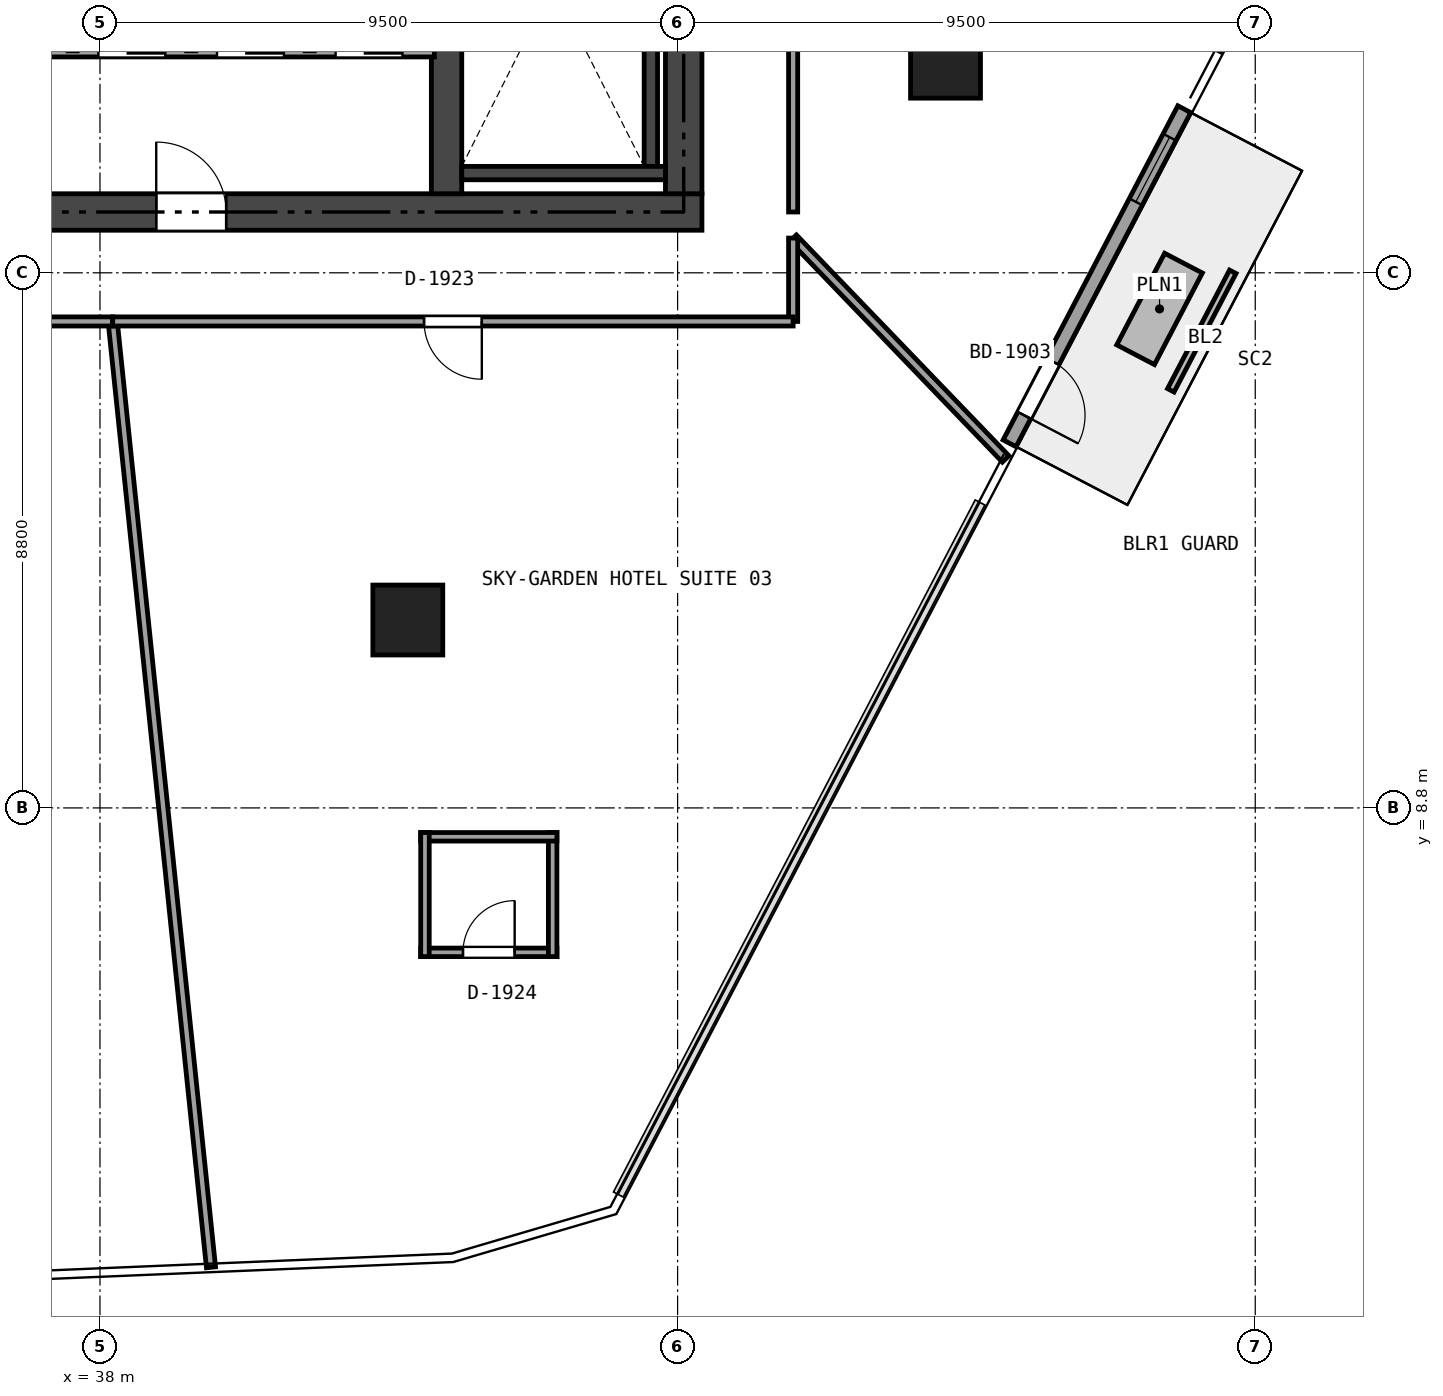
"""IFC4 building model, lengths in metres.
Left out: names, types, materials, properties, quantities, classifications, styles, units other than length and angle.
Written with IfcOpenShell. Run it as: python <this file> out.ifc"""

import sys

from ifc_helpers import new_model, si_unit, direction, frame, frame_2d, origin, origin_2d, place, context, subcontext, project, spatial, rectangle, extrude, element, fill, save


model = new_model("IFC4")
c1 = context("Model", 3, precision=1e-05, world=origin(), true_north=direction((0.0, 1.0)))
c2 = subcontext(c1, "Body", "Model", "MODEL_VIEW")
j1 = project(units=[si_unit("LENGTHUNIT", "METRE"), si_unit("PLANEANGLEUNIT", "RADIAN")], contexts=[c1])
p1 = place(None, origin())
s1 = spatial("IfcSite", under=j1, at=p1, CompositionType="ELEMENT")
p2 = place(p1, origin())
s2 = spatial("IfcBuilding", under=s1, at=p2, CompositionType="ELEMENT")
p3 = place(p2, frame((0.0, 0.0, 76.35)))
s3 = spatial("IfcBuildingStorey", under=s2, at=p3, CompositionType="ELEMENT", Elevation=76.35)
p4 = place(p3, frame((26.5, 18.6, 0.0), z_axis=(0.0, 0.0, 1.0), x_axis=(1.0, 0.0, 0.0)))
e1 = element("IfcWall", 1, at=p4, inside=s3, PredefinedType="SHEAR", context=c2, shape_type="SweptSolid", body=[
    extrude(rectangle(XDim=21.4, YDim=0.6, at=frame_2d((10.7, 0.0))), origin(), (0.0, 0.0, 1.0), 3.17),
])
p5 = place(p4, frame((12.425, 0.0, 0.0)))
e2 = element("IfcOpeningElement", 2, at=p5, cuts=e1, PredefinedType="OPENING", context=c2, shape_type="SweptSolid", body=[
    extrude(rectangle(XDim=1.15, YDim=2.15, at=frame_2d((0.575, 1.075))), frame((0.0, 0.31, 0.0), z_axis=(0.0, -1.0, 0.0), x_axis=(1.0, 0.0, 0.0)), (0.0, 0.0, 1.0), 0.62),
])
p6 = place(p4, frame((5.25, 0.0, 0.0)))
e3 = element("IfcOpeningElement", 3, at=p6, cuts=e1, PredefinedType="OPENING", context=c2, shape_type="SweptSolid", body=[
    extrude(rectangle(XDim=0.9, YDim=2.1, at=frame_2d((0.45, 1.05))), frame((0.0, 0.31, 0.0), z_axis=(0.0, -1.0, 0.0), x_axis=(1.0, 0.0, 0.0)), (0.0, 0.0, 1.0), 0.62),
])
p7 = place(p3, frame((47.6, 18.9, 0.0), z_axis=(0.0, 0.0, 1.0), x_axis=(0.0, 1.0, 0.0)))
e4 = element("IfcWall", 4, at=p7, inside=s3, PredefinedType="SHEAR", context=c2, shape_type="SweptSolid", body=[
    extrude(rectangle(XDim=15.0, YDim=0.6, at=frame_2d((7.5, 0.0))), origin(), (0.0, 0.0, 1.0), 3.17),
])
p8 = place(p7, frame((6.6, 0.0, 0.0)))
e5 = element("IfcOpeningElement", 5, at=p8, cuts=e4, PredefinedType="OPENING", context=c2, shape_type="SweptSolid", body=[
    extrude(rectangle(XDim=1.1, YDim=2.15, at=frame_2d((0.55, 1.075))), frame((0.0, 0.31, 0.0), z_axis=(0.0, -1.0, 0.0), x_axis=(1.0, 0.0, 0.0)), (0.0, 0.0, 1.0), 0.62),
])
p9 = place(p7, frame((8.5, 0.0, 0.0)))
e6 = element("IfcOpeningElement", 6, at=p9, cuts=e4, PredefinedType="OPENING", context=c2, shape_type="SweptSolid", body=[
    extrude(rectangle(XDim=0.9, YDim=2.1, at=frame_2d((0.45, 1.05))), frame((0.0, 0.31, 0.0), z_axis=(0.0, -1.0, 0.0), x_axis=(1.0, 0.0, 0.0)), (0.0, 0.0, 1.0), 0.62),
])
p10 = place(p7, frame((13.15, 0.0, 0.0)))
e7 = element("IfcOpeningElement", 7, at=p10, cuts=e4, PredefinedType="OPENING", context=c2, shape_type="SweptSolid", body=[
    extrude(rectangle(XDim=0.9, YDim=2.1, at=frame_2d((0.45, 1.05))), frame((0.0, 0.31, 0.0), z_axis=(0.0, -1.0, 0.0), x_axis=(1.0, 0.0, 0.0)), (0.0, 0.0, 1.0), 0.62),
])
p11 = place(p3, frame((43.7, 18.9, 0.0), z_axis=(0.0, 0.0, 1.0), x_axis=(0.0, 1.0, 0.0)))
e8 = element("IfcWall", 8, at=p11, inside=s3, PredefinedType="SHEAR", context=c2, shape_type="SweptSolid", body=[
    extrude(rectangle(XDim=15.0, YDim=0.5, at=frame_2d((7.5, 0.0))), origin(), (0.0, 0.0, 1.0), 3.17),
])
p12 = place(p11, frame((8.1, 0.0, 0.0)))
e9 = element("IfcOpeningElement", 9, at=p12, cuts=e8, PredefinedType="OPENING", context=c2, shape_type="SweptSolid", body=[
    extrude(rectangle(XDim=0.9, YDim=2.1, at=frame_2d((0.45, 1.05))), frame((0.0, 0.26, 0.0), z_axis=(0.0, -1.0, 0.0), x_axis=(1.0, 0.0, 0.0)), (0.0, 0.0, 1.0), 0.52),
])
p13 = place(p3, frame((47.06, 19.35, 0.0), z_axis=(0.0, 0.0, 1.0), x_axis=(0.0, 1.0, 0.0)))
e10 = element("IfcWall", 10, at=p13, inside=s3, PredefinedType="SHEAR", context=c2, shape_type="SweptSolid", body=[
    extrude(rectangle(XDim=5.9, YDim=0.22, at=frame_2d((2.95, 0.0))), origin(), (0.0, 0.0, 1.0), 3.17),
])
p14 = place(p3, frame((43.95, 19.24, 0.0), z_axis=(0.0, 0.0, 1.0), x_axis=(1.0, 0.0, 0.0)))
e11 = element("IfcWall", 11, at=p14, inside=s3, PredefinedType="SHEAR", context=c2, shape_type="SweptSolid", body=[
    extrude(rectangle(XDim=3.35, YDim=0.22, at=frame_2d((1.675, 0.0))), origin(), (0.0, 0.0, 1.0), 3.17),
])
for number, where, z_axis, x_axis in (
    (12, (43.063, 11.89, -0.405), (0.0, 0.0, 1.0), (1.0, 0.0, 0.0)),
    (13, (51.906, 21.047, -0.405), (0.0, 0.0, 1.0), (1.0, 0.0, 0.0)),
):
    element("IfcColumn", number, at=place(p3, frame(where, z_axis=z_axis, x_axis=x_axis)), inside=s3, PredefinedType="COLUMN", context=c2, shape_type="SweptSolid", body=[
        extrude(rectangle(XDim=1.15, YDim=1.15, at=origin_2d()), origin(), (0.0, 0.0, 1.0), 3.575),
    ])
p15 = place(p3, frame((55.833, 20.291, 0.0), z_axis=(0.0, 0.0, 1.0), x_axis=(-0.463330108623, -0.8861857652, 0.0)))
e14 = element("IfcWall", 14, at=p15, inside=s3, PredefinedType="SOLIDWALL", context=c2, shape_type="SweptSolid", body=[
    extrude(rectangle(XDim=6.201, YDim=0.24, at=frame_2d((3.101, 0.0))), origin(), (0.0, 0.0, 1.0), 3.17),
])
p16 = place(p15, frame((4.681, 0.0, 0.0)))
e15 = element("IfcOpeningElement", 15, at=p16, cuts=e14, PredefinedType="OPENING", context=c2, shape_type="SweptSolid", body=[
    extrude(rectangle(XDim=1.0, YDim=2.15, at=frame_2d((0.5, 1.075))), frame((0.0, 0.13, 0.0), z_axis=(0.0, -1.0, 0.0), x_axis=(1.0, 0.0, 0.0)), (0.0, 0.0, 1.0), 0.26),
])
p17 = place(p15, frame((0.52, 0.0, 0.2)))
e16 = element("IfcOpeningElement", 16, at=p17, cuts=e14, PredefinedType="OPENING", context=c2, shape_type="SweptSolid", body=[
    extrude(rectangle(XDim=1.2, YDim=1.8, at=frame_2d((0.6, 0.9))), frame((0.0, 0.13, 0.0), z_axis=(0.0, -1.0, 0.0), x_axis=(1.0, 0.0, 0.0)), (0.0, 0.0, 1.0), 0.26),
])
p18 = place(p3, frame((35.62, 21.25, 0.0), z_axis=(0.0, 0.0, 1.0), x_axis=(1.0, 0.0, 0.0)))
e17 = element("IfcWall", 17, at=p18, inside=s3, PredefinedType="SOLIDWALL", context=c2, shape_type="SweptSolid", body=[
    extrude(rectangle(XDim=7.88, YDim=0.2, at=frame_2d((3.94, 0.0))), origin(), (0.0, 0.0, 1.0), 3.17),
])
p19 = place(p18, frame((0.405, 0.0, 0.0)))
e18 = element("IfcOpeningElement", 18, at=p19, cuts=e17, PredefinedType="OPENING", context=c2, shape_type="SweptSolid", body=[
    extrude(rectangle(XDim=1.1, YDim=2.15, at=frame_2d((0.55, 1.075))), frame((0.0, 0.11, 0.0), z_axis=(0.0, -1.0, 0.0), x_axis=(1.0, 0.0, 0.0)), (0.0, 0.0, 1.0), 0.22),
])
p20 = place(p18, frame((2.355, 0.0, 0.0)))
e19 = element("IfcOpeningElement", 19, at=p20, cuts=e17, PredefinedType="OPENING", context=c2, shape_type="SweptSolid", body=[
    extrude(rectangle(XDim=1.1, YDim=2.15, at=frame_2d((0.55, 1.075))), frame((0.0, 0.11, 0.0), z_axis=(0.0, -1.0, 0.0), x_axis=(1.0, 0.0, 0.0)), (0.0, 0.0, 1.0), 0.22),
])
p21 = place(p18, frame((4.305, 0.0, 0.0)))
e20 = element("IfcOpeningElement", 20, at=p21, cuts=e17, PredefinedType="OPENING", context=c2, shape_type="SweptSolid", body=[
    extrude(rectangle(XDim=1.1, YDim=2.15, at=frame_2d((0.55, 1.075))), frame((0.0, 0.11, 0.0), z_axis=(0.0, -1.0, 0.0), x_axis=(1.0, 0.0, 0.0)), (0.0, 0.0, 1.0), 0.22),
])
p22 = place(p18, frame((6.255, 0.0, 0.0)))
e21 = element("IfcOpeningElement", 21, at=p22, cuts=e17, PredefinedType="OPENING", context=c2, shape_type="SweptSolid", body=[
    extrude(rectangle(XDim=1.1, YDim=2.15, at=frame_2d((0.55, 1.075))), frame((0.0, 0.11, 0.0), z_axis=(0.0, -1.0, 0.0), x_axis=(1.0, 0.0, 0.0)), (0.0, 0.0, 1.0), 0.22),
])
p23 = place(p3, frame((43.275, 6.425, 0.0), z_axis=(0.0, 0.0, 1.0), x_axis=(1.0, 0.0, 0.0)))
e22 = element("IfcWall", 22, at=p23, inside=s3, PredefinedType="PARTITIONING", context=c2, shape_type="SweptSolid", body=[
    extrude(rectangle(XDim=2.24, YDim=0.14, at=frame_2d((1.12, 0.0))), origin(), (0.0, 0.0, 1.0), 3.17),
])
p24 = place(p23, frame((0.695, 0.0, 0.0)))
e23 = element("IfcOpeningElement", 23, at=p24, cuts=e22, PredefinedType="OPENING", context=c2, shape_type="SweptSolid", body=[
    extrude(rectangle(XDim=0.85, YDim=2.1, at=frame_2d((0.425, 1.05))), frame((0.0, 0.08, 0.0), z_axis=(0.0, -1.0, 0.0), x_axis=(1.0, 0.0, 0.0)), (0.0, 0.0, 1.0), 0.16),
])
p25 = place(p3, frame((45.445, 6.355, 0.0), z_axis=(0.0, 0.0, 1.0), x_axis=(0.0, 1.0, 0.0)))
e24 = element("IfcWall", 24, at=p25, inside=s3, PredefinedType="PARTITIONING", context=c2, shape_type="SweptSolid", body=[
    extrude(rectangle(XDim=2.04, YDim=0.14, at=frame_2d((1.02, 0.0))), origin(), (0.0, 0.0, 1.0), 3.17),
])
p26 = place(p3, frame((45.515, 8.325, 0.0), z_axis=(0.0, 0.0, 1.0), x_axis=(-1.0, 0.0, 0.0)))
e25 = element("IfcWall", 25, at=p26, inside=s3, PredefinedType="PARTITIONING", context=c2, shape_type="SweptSolid", body=[
    extrude(rectangle(XDim=2.24, YDim=0.14, at=frame_2d((1.12, 0.0))), origin(), (0.0, 0.0, 1.0), 3.17),
])
p27 = place(p3, frame((43.345, 8.395, 0.0), z_axis=(0.0, 0.0, 1.0), x_axis=(0.0, -1.0, 0.0)))
e26 = element("IfcWall", 26, at=p27, inside=s3, PredefinedType="PARTITIONING", context=c2, shape_type="SweptSolid", body=[
    extrude(rectangle(XDim=2.04, YDim=0.14, at=frame_2d((1.02, 0.0))), origin(), (0.0, 0.0, 1.0), 3.17),
])
p28 = place(p3, frame((39.826, 1.245, 0.0), z_axis=(0.0, 0.0, 1.0), x_axis=(-0.103393409404, 0.994640539538, 0.0)))
e27 = element("IfcWall", 27, at=p28, inside=s3, PredefinedType="PARTITIONING", context=c2, shape_type="SweptSolid", body=[
    extrude(rectangle(XDim=15.639, YDim=0.15, at=frame_2d((7.819, 0.0))), origin(), (0.0, 0.0, 1.0), 2.455),
])
p29 = place(p3, frame((38.209, 16.8, 0.0), z_axis=(0.0, 0.0, 1.0), x_axis=(-1.0, 0.0, 0.0)))
e28 = element("IfcWall", 28, at=p29, inside=s3, PredefinedType="PARTITIONING", context=c2, shape_type="SweptSolid", body=[
    extrude(rectangle(XDim=11.671, YDim=0.15, at=frame_2d((5.835, 0.0))), origin(), (0.0, 0.0, 1.0), 2.455),
])
p30 = place(p29, frame((5.361, 0.0, 0.0)))
e29 = element("IfcOpeningElement", 29, at=p30, cuts=e28, PredefinedType="OPENING", context=c2, shape_type="SweptSolid", body=[
    extrude(rectangle(XDim=0.95, YDim=2.15, at=frame_2d((0.475, 1.075))), frame((0.0, 0.085, 0.0), z_axis=(0.0, -1.0, 0.0), x_axis=(1.0, 0.0, 0.0)), (0.0, 0.0, 1.0), 0.17),
])
p31 = place(p3, frame((52.895, 14.539, 0.0), z_axis=(0.0, 0.0, 1.0), x_axis=(-0.693414536175, 0.720538882379, 0.0)))
e30 = element("IfcWall", 30, at=p31, inside=s3, PredefinedType="PARTITIONING", context=c2, shape_type="SweptSolid", body=[
    extrude(rectangle(XDim=5.041, YDim=0.15, at=frame_2d((2.52, 0.0))), origin(), (0.0, 0.0, 1.0), 3.17),
])
p32 = place(p3, frame((49.4, 18.171, 0.0), z_axis=(0.0, 0.0, 1.0), x_axis=(0.0, -1.0, 0.0)))
e31 = element("IfcWall", 31, at=p32, inside=s3, PredefinedType="PARTITIONING", context=c2, shape_type="SweptSolid", body=[
    extrude(rectangle(XDim=1.371, YDim=0.15, at=frame_2d((0.686, 0.0))), origin(), (0.0, 0.0, 1.0), 3.17),
])
p33 = place(p3, frame((49.4, 16.8, 0.0), z_axis=(0.0, 0.0, 1.0), x_axis=(-1.0, 0.0, 0.0)))
e32 = element("IfcWall", 32, at=p33, inside=s3, PredefinedType="PARTITIONING", context=c2, shape_type="SweptSolid", body=[
    extrude(rectangle(XDim=11.191, YDim=0.15, at=frame_2d((5.595, 0.0))), origin(), (0.0, 0.0, 1.0), 2.455),
])
p34 = place(p33, frame((5.12, 0.0, 0.0)))
e33 = element("IfcOpeningElement", 33, at=p34, cuts=e32, PredefinedType="OPENING", context=c2, shape_type="SweptSolid", body=[
    extrude(rectangle(XDim=0.95, YDim=2.15, at=frame_2d((0.475, 1.075))), frame((0.0, 0.085, 0.0), z_axis=(0.0, -1.0, 0.0), x_axis=(1.0, 0.0, 0.0)), (0.0, 0.0, 1.0), 0.17),
])
p35 = place(p3, frame((49.4, 29.669, 0.0), z_axis=(0.0, 0.0, 1.0), x_axis=(0.0, -1.0, 0.0)))
e34 = element("IfcWall", 34, at=p35, inside=s3, PredefinedType="PARTITIONING", context=c2, shape_type="SweptSolid", body=[
    extrude(rectangle(XDim=11.069, YDim=0.15, at=frame_2d((5.534, 0.0))), origin(), (0.0, 0.0, 1.0), 2.455),
])
p36 = place(p35, frame((5.06, 0.0, 0.0)))
e35 = element("IfcOpeningElement", 35, at=p36, cuts=e34, PredefinedType="OPENING", context=c2, shape_type="SweptSolid", body=[
    extrude(rectangle(XDim=0.95, YDim=2.15, at=frame_2d((0.475, 1.075))), frame((0.0, 0.085, 0.0), z_axis=(0.0, -1.0, 0.0), x_axis=(1.0, 0.0, 0.0)), (0.0, 0.0, 1.0), 0.17),
])
p37 = place(p16, origin())
e36 = element("IfcDoor", 36, at=p37, inside=s3, OperationType="SINGLE_SWING_RIGHT", PredefinedType="DOOR", context=c2, shape_type="SweptSolid", body=[
    extrude(rectangle(XDim=1.0, YDim=2.15, at=frame_2d((0.5, 1.075))), frame((0.0, 0.025, 0.0), z_axis=(0.0, -1.0, 0.0), x_axis=(1.0, 0.0, 0.0)), (0.0, 0.0, 1.0), 0.05),
])
fill(e15, e36)
p38 = place(p17, origin())
e37 = element("IfcWindow", 37, at=p38, inside=s3, PartitioningType="SINGLE_PANEL", PredefinedType="WINDOW", context=c2, shape_type="SweptSolid", body=[
    extrude(rectangle(XDim=1.2, YDim=1.8, at=frame_2d((0.6, 0.9))), frame((0.0, 0.03, 0.0), z_axis=(0.0, -1.0, 0.0), x_axis=(1.0, 0.0, 0.0)), (0.0, 0.0, 1.0), 0.06),
])
fill(e16, e37)
p39 = place(p5, origin())
e38 = element("IfcDoor", 38, at=p39, inside=s3, OperationType="SINGLE_SWING_LEFT", PredefinedType="DOOR", context=c2, shape_type="SweptSolid", body=[
    extrude(rectangle(XDim=1.15, YDim=2.15, at=frame_2d((0.575, 1.075))), frame((0.0, 0.025, 0.0), z_axis=(0.0, -1.0, 0.0), x_axis=(1.0, 0.0, 0.0)), (0.0, 0.0, 1.0), 0.05),
])
fill(e2, e38)
p40 = place(p20, origin())
e39 = element("IfcDoor", 39, at=p40, inside=s3, OperationType="SLIDING_TO_LEFT", PredefinedType="DOOR", context=c2, shape_type="SweptSolid", body=[
    extrude(rectangle(XDim=1.1, YDim=2.15, at=frame_2d((0.55, 1.075))), frame((0.0, 0.025, 0.0), z_axis=(0.0, -1.0, 0.0), x_axis=(1.0, 0.0, 0.0)), (0.0, 0.0, 1.0), 0.05),
])
fill(e19, e39)
p41 = place(p21, origin())
e40 = element("IfcDoor", 40, at=p41, inside=s3, OperationType="SLIDING_TO_LEFT", PredefinedType="DOOR", context=c2, shape_type="SweptSolid", body=[
    extrude(rectangle(XDim=1.1, YDim=2.15, at=frame_2d((0.55, 1.075))), frame((0.0, 0.025, 0.0), z_axis=(0.0, -1.0, 0.0), x_axis=(1.0, 0.0, 0.0)), (0.0, 0.0, 1.0), 0.05),
])
fill(e20, e40)
p42 = place(p22, origin())
e41 = element("IfcDoor", 41, at=p42, inside=s3, OperationType="SLIDING_TO_LEFT", PredefinedType="DOOR", context=c2, shape_type="SweptSolid", body=[
    extrude(rectangle(XDim=1.1, YDim=2.15, at=frame_2d((0.55, 1.075))), frame((0.0, 0.025, 0.0), z_axis=(0.0, -1.0, 0.0), x_axis=(1.0, 0.0, 0.0)), (0.0, 0.0, 1.0), 0.05),
])
fill(e21, e41)
p43 = place(p34, origin())
e42 = element("IfcDoor", 42, at=p43, inside=s3, OperationType="SINGLE_SWING_LEFT", PredefinedType="DOOR", context=c2, shape_type="SweptSolid", body=[
    extrude(rectangle(XDim=0.95, YDim=2.15, at=frame_2d((0.475, 1.075))), frame((0.0, 0.025, 0.0), z_axis=(0.0, -1.0, 0.0), x_axis=(1.0, 0.0, 0.0)), (0.0, 0.0, 1.0), 0.05),
])
fill(e33, e42)
p44 = place(p24, origin())
e43 = element("IfcDoor", 43, at=p44, inside=s3, OperationType="SINGLE_SWING_RIGHT", PredefinedType="DOOR", context=c2, shape_type="SweptSolid", body=[
    extrude(rectangle(XDim=0.85, YDim=2.1, at=frame_2d((0.425, 1.05))), frame((0.0, 0.025, 0.0), z_axis=(0.0, -1.0, 0.0), x_axis=(1.0, 0.0, 0.0)), (0.0, 0.0, 1.0), 0.05),
])
fill(e23, e43)
save(model, sys.argv[1])
